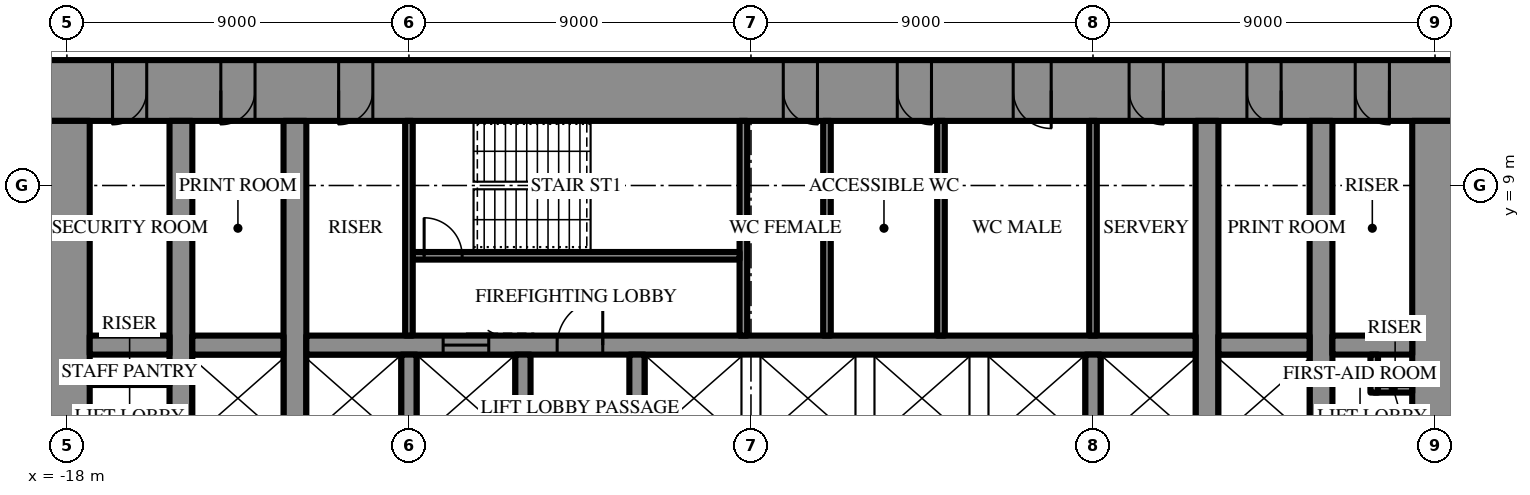
"""IFC4 building model, lengths in metres.
Left out: names, types, materials, properties, quantities, classifications, styles, units other than length and angle.
Written with IfcOpenShell. Run it as: python <this file> out.ifc"""

import sys

from ifc_helpers import new_model, si_unit, direction, frame, frame_2d, origin, place, context, subcontext, project, spatial, rectangle, extrude, element, fill, save


model = new_model("IFC4")
c1 = context("Model", 3, precision=1e-05, world=origin(), true_north=direction((0.0, 1.0)))
c2 = subcontext(c1, "Body", "Model", "MODEL_VIEW")
j1 = project(units=[si_unit("LENGTHUNIT", "METRE"), si_unit("PLANEANGLEUNIT", "RADIAN")], contexts=[c1])
p1 = place(None, origin())
s1 = spatial("IfcSite", under=j1, at=p1, CompositionType="ELEMENT")
p2 = place(p1, origin())
s2 = spatial("IfcBuilding", under=s1, at=p2, CompositionType="ELEMENT")
p3 = place(p2, frame((0.0, 0.0, 144.7)))
s3 = spatial("IfcBuildingStorey", under=s2, at=p3, CompositionType="ELEMENT", Elevation=144.7)
p4 = place(p3, frame((-18.6, 11.5, 0.0), z_axis=(0.0, 0.0, 1.0), x_axis=(1.0, 0.0, 0.0)))
e1 = element("IfcWall", 1, at=p4, inside=s3, PredefinedType="SHEAR", context=c2, shape_type="SweptSolid", body=[
    extrude(rectangle(XDim=37.2, YDim=1.6, at=frame_2d((18.6, 0.0))), origin(), (0.0, 0.0, 1.0), 4.2),
])
p5 = place(p4, frame((19.45, 0.0, 0.0)))
e2 = element("IfcOpeningElement", 2, at=p5, cuts=e1, PredefinedType="OPENING", context=c2, shape_type="SweptSolid", body=[
    extrude(rectangle(XDim=0.9, YDim=2.2, at=frame_2d((0.45, 1.1))), frame((0.0, 0.81, 0.0), z_axis=(0.0, -1.0, 0.0), x_axis=(1.0, 0.0, 0.0)), (0.0, 0.0, 1.0), 1.62),
])
p6 = place(p4, frame((22.45, 0.0, 0.0)))
e3 = element("IfcOpeningElement", 3, at=p6, cuts=e1, PredefinedType="OPENING", context=c2, shape_type="SweptSolid", body=[
    extrude(rectangle(XDim=0.9, YDim=2.2, at=frame_2d((0.45, 1.1))), frame((0.0, 0.81, 0.0), z_axis=(0.0, -1.0, 0.0), x_axis=(1.0, 0.0, 0.0)), (0.0, 0.0, 1.0), 1.62),
])
p7 = place(p4, frame((25.5, 0.0, 0.0)))
e4 = element("IfcOpeningElement", 4, at=p7, cuts=e1, PredefinedType="OPENING", context=c2, shape_type="SweptSolid", body=[
    extrude(rectangle(XDim=1.0, YDim=2.2, at=frame_2d((0.5, 1.1))), frame((0.0, 0.81, 0.0), z_axis=(0.0, -1.0, 0.0), x_axis=(1.0, 0.0, 0.0)), (0.0, 0.0, 1.0), 1.62),
])
p8 = place(p4, frame((1.8, 0.0, 0.0)))
e5 = element("IfcOpeningElement", 5, at=p8, cuts=e1, PredefinedType="OPENING", context=c2, shape_type="SweptSolid", body=[
    extrude(rectangle(XDim=0.9, YDim=2.2, at=frame_2d((0.45, 1.1))), frame((0.0, 0.81, 0.0), z_axis=(0.0, -1.0, 0.0), x_axis=(1.0, 0.0, 0.0)), (0.0, 0.0, 1.0), 1.62),
])
p9 = place(p4, frame((4.65, 0.0, 0.0)))
e6 = element("IfcOpeningElement", 6, at=p9, cuts=e1, PredefinedType="OPENING", context=c2, shape_type="SweptSolid", body=[
    extrude(rectangle(XDim=0.9, YDim=2.2, at=frame_2d((0.45, 1.1))), frame((0.0, 0.81, 0.0), z_axis=(0.0, -1.0, 0.0), x_axis=(1.0, 0.0, 0.0)), (0.0, 0.0, 1.0), 1.62),
])
p10 = place(p4, frame((7.75, 0.0, 0.0)))
e7 = element("IfcOpeningElement", 7, at=p10, cuts=e1, PredefinedType="OPENING", context=c2, shape_type="SweptSolid", body=[
    extrude(rectangle(XDim=0.9, YDim=2.2, at=frame_2d((0.45, 1.1))), frame((0.0, 0.81, 0.0), z_axis=(0.0, -1.0, 0.0), x_axis=(1.0, 0.0, 0.0)), (0.0, 0.0, 1.0), 1.62),
])
p11 = place(p4, frame((28.55, 0.0, 0.0)))
e8 = element("IfcOpeningElement", 8, at=p11, cuts=e1, PredefinedType="OPENING", context=c2, shape_type="SweptSolid", body=[
    extrude(rectangle(XDim=0.9, YDim=2.2, at=frame_2d((0.45, 1.1))), frame((0.0, 0.81, 0.0), z_axis=(0.0, -1.0, 0.0), x_axis=(1.0, 0.0, 0.0)), (0.0, 0.0, 1.0), 1.62),
])
p12 = place(p4, frame((31.65, 0.0, 0.0)))
e9 = element("IfcOpeningElement", 9, at=p12, cuts=e1, PredefinedType="OPENING", context=c2, shape_type="SweptSolid", body=[
    extrude(rectangle(XDim=0.9, YDim=2.2, at=frame_2d((0.45, 1.1))), frame((0.0, 0.81, 0.0), z_axis=(0.0, -1.0, 0.0), x_axis=(1.0, 0.0, 0.0)), (0.0, 0.0, 1.0), 1.62),
])
p13 = place(p4, frame((34.5, 0.0, 0.0)))
e10 = element("IfcOpeningElement", 10, at=p13, cuts=e1, PredefinedType="OPENING", context=c2, shape_type="SweptSolid", body=[
    extrude(rectangle(XDim=0.9, YDim=2.2, at=frame_2d((0.45, 1.1))), frame((0.0, 0.81, 0.0), z_axis=(0.0, -1.0, 0.0), x_axis=(1.0, 0.0, 0.0)), (0.0, 0.0, 1.0), 1.62),
])
p14 = place(p3, frame((18.0, -10.7, 0.0), z_axis=(0.0, 0.0, 1.0), x_axis=(0.0, 1.0, 0.0)))
e11 = element("IfcWall", 11, at=p14, inside=s3, PredefinedType="SHEAR", context=c2, shape_type="SweptSolid", body=[
    extrude(rectangle(XDim=21.4, YDim=1.2, at=frame_2d((10.7, 0.0))), origin(), (0.0, 0.0, 1.0), 4.2),
])
p15 = place(p14, frame((9.8, 0.0, 0.0)))
e12 = element("IfcOpeningElement", 12, at=p15, cuts=e11, PredefinedType="OPENING", context=c2, shape_type="SweptSolid", body=[
    extrude(rectangle(XDim=1.8, YDim=2.4, at=frame_2d((0.9, 1.2))), frame((0.0, 0.61, 0.0), z_axis=(0.0, -1.0, 0.0), x_axis=(1.0, 0.0, 0.0)), (0.0, 0.0, 1.0), 1.22),
])
p16 = place(p3, frame((-18.0, 10.7, 0.0), z_axis=(0.0, 0.0, 1.0), x_axis=(0.0, -1.0, 0.0)))
e13 = element("IfcWall", 13, at=p16, inside=s3, PredefinedType="SHEAR", context=c2, shape_type="SweptSolid", body=[
    extrude(rectangle(XDim=21.4, YDim=1.2, at=frame_2d((10.7, 0.0))), origin(), (0.0, 0.0, 1.0), 4.2),
])
p17 = place(p16, frame((9.8, 0.0, 0.0)))
e14 = element("IfcOpeningElement", 14, at=p17, cuts=e13, PredefinedType="OPENING", context=c2, shape_type="SweptSolid", body=[
    extrude(rectangle(XDim=1.8, YDim=2.4, at=frame_2d((0.9, 1.2))), frame((0.0, 0.61, 0.0), z_axis=(0.0, -1.0, 0.0), x_axis=(1.0, 0.0, 0.0)), (0.0, 0.0, 1.0), 1.22),
])
p18 = place(p3, frame((12.0, -10.7, 0.0), z_axis=(0.0, 0.0, 1.0), x_axis=(0.0, 1.0, 0.0)))
e15 = element("IfcWall", 15, at=p18, inside=s3, PredefinedType="SHEAR", context=c2, shape_type="SweptSolid", body=[
    extrude(rectangle(XDim=21.4, YDim=0.6, at=frame_2d((10.7, 0.0))), origin(), (0.0, 0.0, 1.0), 4.2),
])
p19 = place(p18, frame((9.8, 0.0, 0.0)))
e16 = element("IfcOpeningElement", 16, at=p19, cuts=e15, PredefinedType="OPENING", context=c2, shape_type="SweptSolid", body=[
    extrude(rectangle(XDim=1.8, YDim=2.4, at=frame_2d((0.9, 1.2))), frame((0.0, 0.31, 0.0), z_axis=(0.0, -1.0, 0.0), x_axis=(1.0, 0.0, 0.0)), (0.0, 0.0, 1.0), 0.62),
])
p20 = place(p3, frame((-12.0, -10.7, 0.0), z_axis=(0.0, 0.0, 1.0), x_axis=(0.0, 1.0, 0.0)))
e17 = element("IfcWall", 17, at=p20, inside=s3, PredefinedType="SHEAR", context=c2, shape_type="SweptSolid", body=[
    extrude(rectangle(XDim=21.4, YDim=0.6, at=frame_2d((10.7, 0.0))), origin(), (0.0, 0.0, 1.0), 4.2),
])
p21 = place(p20, frame((9.8, 0.0, 0.0)))
e18 = element("IfcOpeningElement", 18, at=p21, cuts=e17, PredefinedType="OPENING", context=c2, shape_type="SweptSolid", body=[
    extrude(rectangle(XDim=1.8, YDim=2.4, at=frame_2d((0.9, 1.2))), frame((0.0, 0.31, 0.0), z_axis=(0.0, -1.0, 0.0), x_axis=(1.0, 0.0, 0.0)), (0.0, 0.0, 1.0), 0.62),
])
p22 = place(p3, frame((15.0, -10.7, 0.0), z_axis=(0.0, 0.0, 1.0), x_axis=(0.0, 1.0, 0.0)))
e19 = element("IfcWall", 19, at=p22, inside=s3, PredefinedType="SHEAR", context=c2, shape_type="SweptSolid", body=[
    extrude(rectangle(XDim=21.4, YDim=0.6, at=frame_2d((10.7, 0.0))), origin(), (0.0, 0.0, 1.0), 4.2),
])
p23 = place(p22, frame((9.8, 0.0, 0.0)))
e20 = element("IfcOpeningElement", 20, at=p23, cuts=e19, PredefinedType="OPENING", context=c2, shape_type="SweptSolid", body=[
    extrude(rectangle(XDim=1.8, YDim=2.4, at=frame_2d((0.9, 1.2))), frame((0.0, 0.31, 0.0), z_axis=(0.0, -1.0, 0.0), x_axis=(1.0, 0.0, 0.0)), (0.0, 0.0, 1.0), 0.62),
])
p24 = place(p3, frame((-15.0, -10.7, 0.0), z_axis=(0.0, 0.0, 1.0), x_axis=(0.0, 1.0, 0.0)))
e21 = element("IfcWall", 21, at=p24, inside=s3, PredefinedType="SHEAR", context=c2, shape_type="SweptSolid", body=[
    extrude(rectangle(XDim=21.4, YDim=0.6, at=frame_2d((10.7, 0.0))), origin(), (0.0, 0.0, 1.0), 4.2),
])
p25 = place(p24, frame((9.8, 0.0, 0.0)))
e22 = element("IfcOpeningElement", 22, at=p25, cuts=e21, PredefinedType="OPENING", context=c2, shape_type="SweptSolid", body=[
    extrude(rectangle(XDim=1.8, YDim=2.4, at=frame_2d((0.9, 1.2))), frame((0.0, 0.31, 0.0), z_axis=(0.0, -1.0, 0.0), x_axis=(1.0, 0.0, 0.0)), (0.0, 0.0, 1.0), 0.62),
])
p26 = place(p3, frame((-17.4, 4.8, 0.0), z_axis=(0.0, 0.0, 1.0), x_axis=(1.0, 0.0, 0.0)))
e23 = element("IfcWall", 23, at=p26, inside=s3, PredefinedType="SHEAR", context=c2, shape_type="SweptSolid", body=[
    extrude(rectangle(XDim=2.1, YDim=0.5, at=frame_2d((1.05, 0.0))), origin(), (0.0, 0.0, 1.0), 4.2),
])
p27 = place(p3, frame((-14.7, 4.8, 0.0), z_axis=(0.0, 0.0, 1.0), x_axis=(1.0, 0.0, 0.0)))
e24 = element("IfcWall", 24, at=p27, inside=s3, PredefinedType="SHEAR", context=c2, shape_type="SweptSolid", body=[
    extrude(rectangle(XDim=2.4, YDim=0.5, at=frame_2d((1.2, 0.0))), origin(), (0.0, 0.0, 1.0), 4.2),
])
p28 = place(p3, frame((-11.7, 4.8, 0.0), z_axis=(0.0, 0.0, 1.0), x_axis=(1.0, 0.0, 0.0)))
e25 = element("IfcWall", 25, at=p28, inside=s3, PredefinedType="SHEAR", context=c2, shape_type="SweptSolid", body=[
    extrude(rectangle(XDim=23.4, YDim=0.5, at=frame_2d((11.7, 0.0))), origin(), (0.0, 0.0, 1.0), 4.2),
])
p29 = place(p28, frame((6.6, 0.0, 0.0)))
e26 = element("IfcOpeningElement", 26, at=p29, cuts=e25, PredefinedType="OPENING", context=c2, shape_type="SweptSolid", body=[
    extrude(rectangle(XDim=1.2, YDim=2.2, at=frame_2d((0.6, 1.1))), frame((0.0, 0.26, 0.0), z_axis=(0.0, -1.0, 0.0), x_axis=(1.0, 0.0, 0.0)), (0.0, 0.0, 1.0), 0.52),
])
p30 = place(p28, frame((3.6, 0.0, 0.0)))
e27 = element("IfcOpeningElement", 27, at=p30, cuts=e25, PredefinedType="OPENING", context=c2, shape_type="SweptSolid", body=[
    extrude(rectangle(XDim=1.2, YDim=2.2, at=frame_2d((0.6, 1.1))), frame((0.0, 0.26, 0.0), z_axis=(0.0, -1.0, 0.0), x_axis=(1.0, 0.0, 0.0)), (0.0, 0.0, 1.0), 0.52),
])
p31 = place(p3, frame((12.3, 4.8, 0.0), z_axis=(0.0, 0.0, 1.0), x_axis=(1.0, 0.0, 0.0)))
e28 = element("IfcWall", 28, at=p31, inside=s3, PredefinedType="SHEAR", context=c2, shape_type="SweptSolid", body=[
    extrude(rectangle(XDim=2.4, YDim=0.5, at=frame_2d((1.2, 0.0))), origin(), (0.0, 0.0, 1.0), 4.2),
])
p32 = place(p3, frame((15.3, 4.8, 0.0), z_axis=(0.0, 0.0, 1.0), x_axis=(1.0, 0.0, 0.0)))
e29 = element("IfcWall", 29, at=p32, inside=s3, PredefinedType="SHEAR", context=c2, shape_type="SweptSolid", body=[
    extrude(rectangle(XDim=2.1, YDim=0.5, at=frame_2d((1.05, 0.0))), origin(), (0.0, 0.0, 1.0), 4.2),
])
for number, where, z_axis, x_axis in (
    (30, (-9.0, 2.25, 0.0), (0.0, 0.0, 1.0), (0.0, 1.0, 0.0)),
    (31, (-6.0, 2.25, 0.0), (0.0, 0.0, 1.0), (0.0, 1.0, 0.0)),
    (32, (-3.0, 2.25, 0.0), (0.0, 0.0, 1.0), (0.0, 1.0, 0.0)),
    (33, (9.0, 2.25, 0.0), (0.0, 0.0, 1.0), (0.0, 1.0, 0.0)),
):
    element("IfcWall", number, at=place(p3, frame(where, z_axis=z_axis, x_axis=x_axis)), inside=s3, PredefinedType="SHEAR", context=c2, shape_type="SweptSolid", body=[
        extrude(rectangle(XDim=2.3, YDim=0.4, at=frame_2d((1.15, 0.0))), origin(), (0.0, 0.0, 1.0), 4.2),
    ])
p33 = place(p3, frame((-0.2, 5.05, 0.0), z_axis=(0.0, 0.0, 1.0), x_axis=(0.0, 1.0, 0.0)))
e34 = element("IfcWall", 34, at=p33, inside=s3, PredefinedType="SHEAR", context=c2, shape_type="SweptSolid", body=[
    extrude(rectangle(XDim=5.65, YDim=0.2, at=frame_2d((2.825, 0.0))), origin(), (0.0, 0.0, 1.0), 4.2),
])
p34 = place(p3, frame((-8.9, 7.15, 0.0), z_axis=(0.0, 0.0, 1.0), x_axis=(1.0, 0.0, 0.0)))
e35 = element("IfcWall", 35, at=p34, inside=s3, PredefinedType="SHEAR", context=c2, shape_type="SweptSolid", body=[
    extrude(rectangle(XDim=8.6, YDim=0.2, at=frame_2d((4.3, 0.0))), origin(), (0.0, 0.0, 1.0), 4.2),
])
p35 = place(p34, frame((0.3, 0.0, 0.0)))
e36 = element("IfcOpeningElement", 36, at=p35, cuts=e35, PredefinedType="OPENING", context=c2, shape_type="SweptSolid", body=[
    extrude(rectangle(XDim=1.0, YDim=2.2, at=frame_2d((0.5, 1.1))), frame((0.0, 0.11, 0.0), z_axis=(0.0, -1.0, 0.0), x_axis=(1.0, 0.0, 0.0)), (0.0, 0.0, 1.0), 0.22),
])
for number, where, z_axis, x_axis in (
    (37, (-9.0, 5.05, 0.0), (0.0, 0.0, 1.0), (0.0, 1.0, 0.0)),
    (38, (9.0, 5.05, 0.0), (0.0, 0.0, 1.0), (0.0, 1.0, 0.0)),
    (39, (2.0, 5.05, 0.0), (0.0, 0.0, 1.0), (0.0, 1.0, 0.0)),
    (40, (5.0, 5.05, 0.0), (0.0, 0.0, 1.0), (0.0, 1.0, 0.0)),
):
    element("IfcWall", number, at=place(p3, frame(where, z_axis=z_axis, x_axis=x_axis)), inside=s3, PredefinedType="PARTITIONING", context=c2, shape_type="SweptSolid", body=[
        extrude(rectangle(XDim=5.65, YDim=0.2, at=frame_2d((2.825, 0.0))), origin(), (0.0, 0.0, 1.0), 4.0),
    ])
p36 = place(p3, frame((-17.4, 3.85, 0.0), z_axis=(0.0, 0.0, 1.0), x_axis=(1.0, 0.0, 0.0)))
e41 = element("IfcWall", 41, at=p36, inside=s3, PredefinedType="PARTITIONING", context=c2, shape_type="SweptSolid", body=[
    extrude(rectangle(XDim=2.1, YDim=0.2, at=frame_2d((1.05, 0.0))), origin(), (0.0, 0.0, 1.0), 4.0),
])
for number, where, z_axis, x_axis in (
    (42, (16.4, 3.65, 0.0), (0.0, 0.0, 1.0), (1.0, 0.0, 0.0)),
    (43, (16.4, 3.55, 0.0), (0.0, 0.0, 1.0), (0.0, 1.0, 0.0)),
):
    element("IfcWall", number, at=place(p3, frame(where, z_axis=z_axis, x_axis=x_axis)), inside=s3, PredefinedType="PARTITIONING", context=c2, shape_type="SweptSolid", body=[
        extrude(rectangle(XDim=1.0, YDim=0.2, at=frame_2d((0.5, 0.0))), origin(), (0.0, 0.0, 1.0), 4.0),
    ])
p37 = place(p29, origin())
e44 = element("IfcDoor", 44, at=p37, inside=s3, OperationType="SINGLE_SWING_LEFT", PredefinedType="DOOR", context=c2, shape_type="SweptSolid", body=[
    extrude(rectangle(XDim=1.2, YDim=2.2, at=frame_2d((0.6, 1.1))), frame((0.0, 0.025, 0.0), z_axis=(0.0, -1.0, 0.0), x_axis=(1.0, 0.0, 0.0)), (0.0, 0.0, 1.0), 0.05),
])
fill(e26, e44)
p38 = place(p35, origin())
e45 = element("IfcDoor", 45, at=p38, inside=s3, OperationType="SINGLE_SWING_RIGHT", PredefinedType="DOOR", context=c2, shape_type="SweptSolid", body=[
    extrude(rectangle(XDim=1.0, YDim=2.2, at=frame_2d((0.5, 1.1))), frame((0.0, 0.025, 0.0), z_axis=(0.0, -1.0, 0.0), x_axis=(1.0, 0.0, 0.0)), (0.0, 0.0, 1.0), 0.05),
])
fill(e36, e45)
p39 = place(p5, frame((0.9, 0.0, 0.0), z_axis=(0.0, 0.0, 1.0), x_axis=(-1.0, 0.0, 0.0)))
e46 = element("IfcDoor", 46, at=p39, inside=s3, OperationType="SINGLE_SWING_RIGHT", PredefinedType="DOOR", context=c2, shape_type="SweptSolid", body=[
    extrude(rectangle(XDim=0.9, YDim=2.2, at=frame_2d((0.45, 1.1))), frame((0.0, 0.025, 0.0), z_axis=(0.0, -1.0, 0.0), x_axis=(1.0, 0.0, 0.0)), (0.0, 0.0, 1.0), 0.05),
])
fill(e2, e46)
p40 = place(p6, frame((0.9, 0.0, 0.0), z_axis=(0.0, 0.0, 1.0), x_axis=(-1.0, 0.0, 0.0)))
e47 = element("IfcDoor", 47, at=p40, inside=s3, OperationType="SINGLE_SWING_RIGHT", PredefinedType="DOOR", context=c2, shape_type="SweptSolid", body=[
    extrude(rectangle(XDim=0.9, YDim=2.2, at=frame_2d((0.45, 1.1))), frame((0.0, 0.025, 0.0), z_axis=(0.0, -1.0, 0.0), x_axis=(1.0, 0.0, 0.0)), (0.0, 0.0, 1.0), 0.05),
])
fill(e3, e47)
p41 = place(p7, frame((1.0, 0.0, 0.0), z_axis=(0.0, 0.0, 1.0), x_axis=(-1.0, 0.0, 0.0)))
e48 = element("IfcDoor", 48, at=p41, inside=s3, OperationType="SINGLE_SWING_RIGHT", PredefinedType="DOOR", context=c2, shape_type="SweptSolid", body=[
    extrude(rectangle(XDim=1.0, YDim=2.2, at=frame_2d((0.5, 1.1))), frame((0.0, 0.025, 0.0), z_axis=(0.0, -1.0, 0.0), x_axis=(1.0, 0.0, 0.0)), (0.0, 0.0, 1.0), 0.05),
])
fill(e4, e48)
p42 = place(p8, frame((0.9, 0.0, 0.0), z_axis=(0.0, 0.0, 1.0), x_axis=(-1.0, 0.0, 0.0)))
e49 = element("IfcDoor", 49, at=p42, inside=s3, OperationType="SINGLE_SWING_LEFT", PredefinedType="DOOR", context=c2, shape_type="SweptSolid", body=[
    extrude(rectangle(XDim=0.9, YDim=2.2, at=frame_2d((0.45, 1.1))), frame((0.0, 0.025, 0.0), z_axis=(0.0, -1.0, 0.0), x_axis=(1.0, 0.0, 0.0)), (0.0, 0.0, 1.0), 0.05),
])
fill(e5, e49)
p43 = place(p9, frame((0.9, 0.0, 0.0), z_axis=(0.0, 0.0, 1.0), x_axis=(-1.0, 0.0, 0.0)))
e50 = element("IfcDoor", 50, at=p43, inside=s3, OperationType="SINGLE_SWING_LEFT", PredefinedType="DOOR", context=c2, shape_type="SweptSolid", body=[
    extrude(rectangle(XDim=0.9, YDim=2.2, at=frame_2d((0.45, 1.1))), frame((0.0, 0.025, 0.0), z_axis=(0.0, -1.0, 0.0), x_axis=(1.0, 0.0, 0.0)), (0.0, 0.0, 1.0), 0.05),
])
fill(e6, e50)
p44 = place(p10, frame((0.9, 0.0, 0.0), z_axis=(0.0, 0.0, 1.0), x_axis=(-1.0, 0.0, 0.0)))
e51 = element("IfcDoor", 51, at=p44, inside=s3, OperationType="SINGLE_SWING_LEFT", PredefinedType="DOOR", context=c2, shape_type="SweptSolid", body=[
    extrude(rectangle(XDim=0.9, YDim=2.2, at=frame_2d((0.45, 1.1))), frame((0.0, 0.025, 0.0), z_axis=(0.0, -1.0, 0.0), x_axis=(1.0, 0.0, 0.0)), (0.0, 0.0, 1.0), 0.05),
])
fill(e7, e51)
p45 = place(p11, frame((0.9, 0.0, 0.0), z_axis=(0.0, 0.0, 1.0), x_axis=(-1.0, 0.0, 0.0)))
e52 = element("IfcDoor", 52, at=p45, inside=s3, OperationType="SINGLE_SWING_RIGHT", PredefinedType="DOOR", context=c2, shape_type="SweptSolid", body=[
    extrude(rectangle(XDim=0.9, YDim=2.2, at=frame_2d((0.45, 1.1))), frame((0.0, 0.025, 0.0), z_axis=(0.0, -1.0, 0.0), x_axis=(1.0, 0.0, 0.0)), (0.0, 0.0, 1.0), 0.05),
])
fill(e8, e52)
p46 = place(p12, frame((0.9, 0.0, 0.0), z_axis=(0.0, 0.0, 1.0), x_axis=(-1.0, 0.0, 0.0)))
e53 = element("IfcDoor", 53, at=p46, inside=s3, OperationType="SINGLE_SWING_RIGHT", PredefinedType="DOOR", context=c2, shape_type="SweptSolid", body=[
    extrude(rectangle(XDim=0.9, YDim=2.2, at=frame_2d((0.45, 1.1))), frame((0.0, 0.025, 0.0), z_axis=(0.0, -1.0, 0.0), x_axis=(1.0, 0.0, 0.0)), (0.0, 0.0, 1.0), 0.05),
])
fill(e9, e53)
p47 = place(p13, frame((0.9, 0.0, 0.0), z_axis=(0.0, 0.0, 1.0), x_axis=(-1.0, 0.0, 0.0)))
e54 = element("IfcDoor", 54, at=p47, inside=s3, OperationType="SINGLE_SWING_RIGHT", PredefinedType="DOOR", context=c2, shape_type="SweptSolid", body=[
    extrude(rectangle(XDim=0.9, YDim=2.2, at=frame_2d((0.45, 1.1))), frame((0.0, 0.025, 0.0), z_axis=(0.0, -1.0, 0.0), x_axis=(1.0, 0.0, 0.0)), (0.0, 0.0, 1.0), 0.05),
])
fill(e10, e54)
p48 = place(p30, origin())
e55 = element("IfcDoor", 55, at=p48, inside=s3, OperationType="SLIDING_TO_LEFT", PredefinedType="DOOR", context=c2, shape_type="SweptSolid", body=[
    extrude(rectangle(XDim=1.2, YDim=2.2, at=frame_2d((0.6, 1.1))), frame((0.0, 0.025, 0.0), z_axis=(0.0, -1.0, 0.0), x_axis=(1.0, 0.0, 0.0)), (0.0, 0.0, 1.0), 0.05),
])
fill(e27, e55)
save(model, sys.argv[1])
